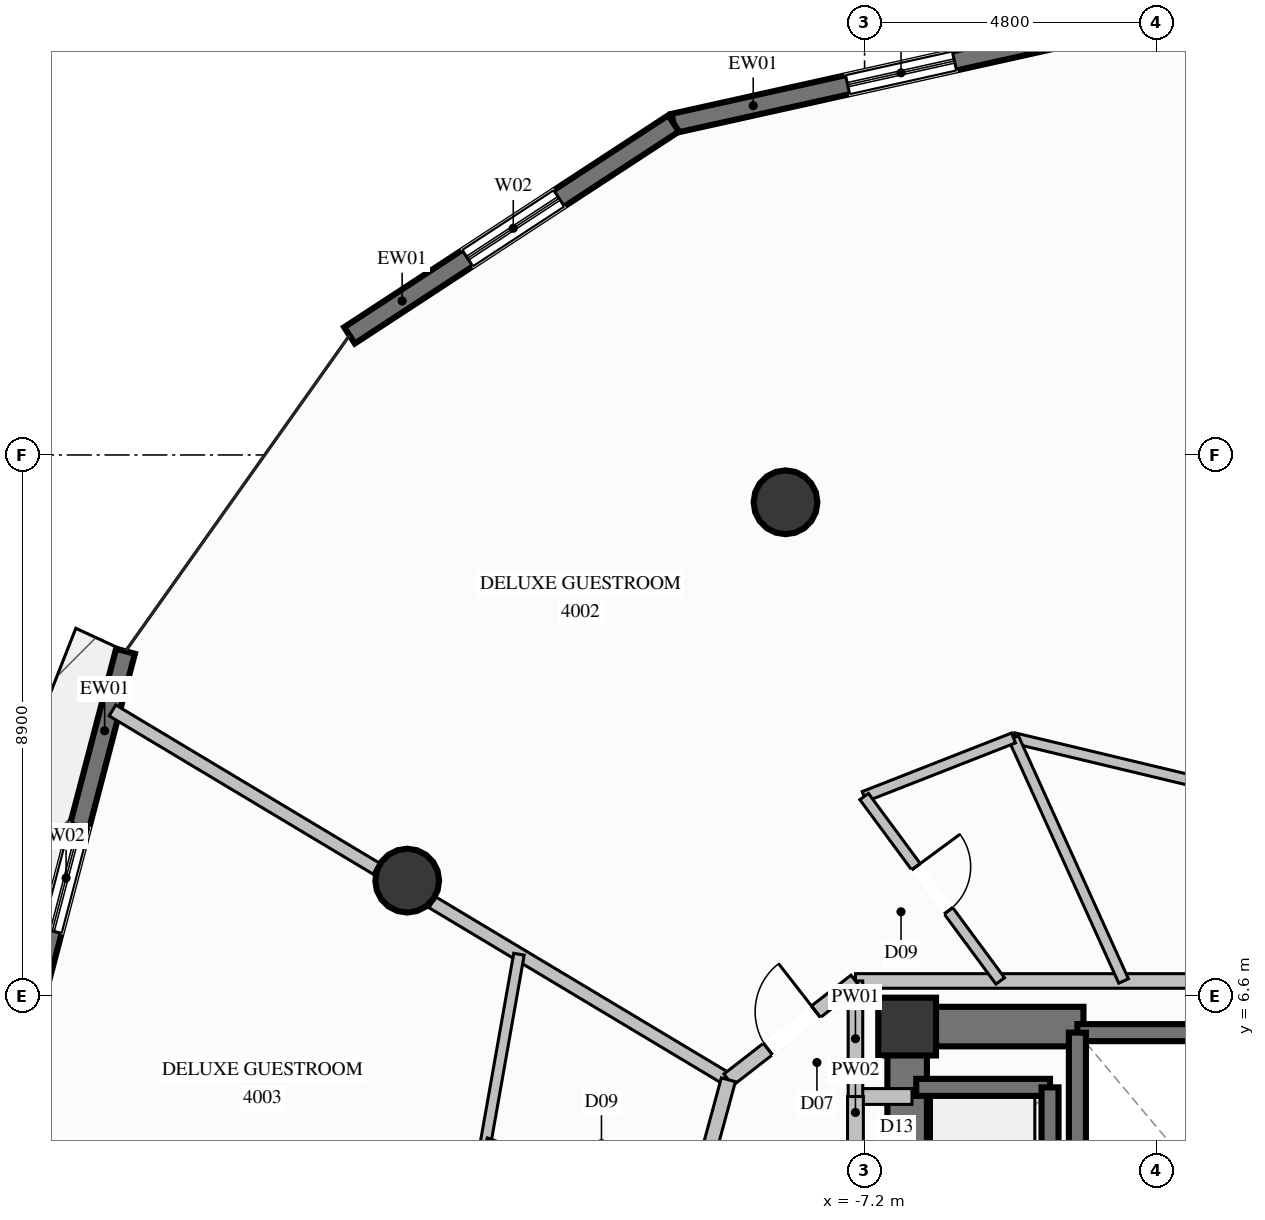
"""IFC4 building model, lengths in metres.
Left out: names, types, materials, properties, quantities, classifications, styles, units other than length and angle.
Written with IfcOpenShell. Run it as: python <this file> out.ifc"""

import sys

from ifc_helpers import new_model, si_unit, direction, frame, frame_2d, origin, origin_2d, place, context, subcontext, project, spatial, rectangle, circle, extrude, element, fill, save


model = new_model("IFC4")
c1 = context("Model", 3, precision=1e-05, world=origin(), true_north=direction((0.0, 1.0)))
c2 = subcontext(c1, "Body", "Model", "MODEL_VIEW")
j1 = project(units=[si_unit("LENGTHUNIT", "METRE"), si_unit("PLANEANGLEUNIT", "RADIAN")], contexts=[c1])
p1 = place(None, origin())
s1 = spatial("IfcSite", under=j1, at=p1, CompositionType="ELEMENT")
p2 = place(p1, origin())
s2 = spatial("IfcBuilding", under=s1, at=p2, CompositionType="ELEMENT")
p3 = place(p2, frame((0.0, 0.0, 149.4)))
s3 = spatial("IfcBuildingStorey", under=s2, at=p3, CompositionType="ELEMENT", Elevation=149.4)
p4 = place(p3, frame((-6.5, 6.1, 0.0), z_axis=(0.0, 0.0, 1.0), x_axis=(1.0, 0.0, 0.0)))
e1 = element("IfcColumn", 1, at=p4, inside=s3, PredefinedType="COLUMN", context=c2, shape_type="SweptSolid", body=[
    extrude(rectangle(XDim=0.95, YDim=0.95, at=origin_2d()), origin(), (0.0, 0.0, 1.0), 3.6),
])
p5 = place(p3, frame((-6.175, 6.1, 0.0), z_axis=(0.0, 0.0, 1.0), x_axis=(1.0, 0.0, 0.0)))
e2 = element("IfcWall", 2, at=p5, inside=s3, PredefinedType="SHEAR", context=c2, shape_type="SweptSolid", body=[
    extrude(rectangle(XDim=2.575, YDim=0.65, at=frame_2d((1.288, 0.0))), origin(), (0.0, 0.0, 1.0), 3.6),
])
p6 = place(p3, frame((-6.5, 2.35, 0.0), z_axis=(0.0, 0.0, 1.0), x_axis=(0.0, 1.0, 0.0)))
e3 = element("IfcWall", 3, at=p6, inside=s3, PredefinedType="SHEAR", context=c2, shape_type="SweptSolid", body=[
    extrude(rectangle(XDim=4.075, YDim=0.65, at=frame_2d((2.038, 0.0))), origin(), (0.0, 0.0, 1.0), 3.6),
])
for number, where, z_axis, x_axis in (
    (4, (-8.5, 14.722, 0.0), (0.0, 0.0, 1.0), (1.0, 0.0, 0.0)),
    (5, (-14.722, 8.5, 0.0), (0.0, 0.0, 1.0), (1.0, 0.0, 0.0)),
):
    element("IfcColumn", number, at=place(p3, frame(where, z_axis=z_axis, x_axis=x_axis)), inside=s3, PredefinedType="COLUMN", context=c2, shape_type="SweptSolid", body=[
        extrude(circle(Radius=0.525, at=origin_2d()), origin(), (0.0, 0.0, 1.0), 3.6),
    ])
p7 = place(p3, frame((-10.34, 20.953, 0.0), z_axis=(0.0, 0.0, 1.0), x_axis=(0.976167944805, 0.217016459136, 0.0)))
e6 = element("IfcWall", 6, at=p7, inside=s3, PredefinedType="SOLIDWALL", context=c2, shape_type="SweptSolid", body=[
    extrude(rectangle(XDim=6.613, YDim=0.32, at=frame_2d((3.306, 0.0))), origin(), (0.0, 0.0, 1.0), 3.35),
])
p8 = place(p7, frame((2.931, 0.0, 0.35)))
e7 = element("IfcOpeningElement", 7, at=p8, cuts=e6, PredefinedType="OPENING", context=c2, shape_type="SweptSolid", body=[
    extrude(rectangle(XDim=1.8, YDim=2.6, at=frame_2d((0.9, 1.3))), frame((0.0, 0.17, 0.0), z_axis=(0.0, -1.0, 0.0), x_axis=(1.0, 0.0, 0.0)), (0.0, 0.0, 1.0), 0.34),
])
p9 = place(p3, frame((-15.671, 17.467, 0.0), z_axis=(0.0, 0.0, 1.0), x_axis=(0.83694732993, 0.547283442947, 0.0)))
e8 = element("IfcWall", 8, at=p9, inside=s3, PredefinedType="SOLIDWALL", context=c2, shape_type="SweptSolid", body=[
    extrude(rectangle(XDim=6.369, YDim=0.32, at=frame_2d((3.185, 0.0))), origin(), (0.0, 0.0, 1.0), 3.35),
])
p10 = place(p9, frame((2.318, 0.0, 0.35)))
e9 = element("IfcOpeningElement", 9, at=p10, cuts=e8, PredefinedType="OPENING", context=c2, shape_type="SweptSolid", body=[
    extrude(rectangle(XDim=1.8, YDim=2.6, at=frame_2d((0.9, 1.3))), frame((0.0, 0.17, 0.0), z_axis=(0.0, -1.0, 0.0), x_axis=(1.0, 0.0, 0.0)), (0.0, 0.0, 1.0), 0.34),
])
p11 = place(p3, frame((-21.032, 5.875, 0.0), z_axis=(0.0, 0.0, 1.0), x_axis=(0.253586412891, 0.967312737018, 0.0)))
e10 = element("IfcWall", 10, at=p11, inside=s3, PredefinedType="SOLIDWALL", context=c2, shape_type="SweptSolid", body=[
    extrude(rectangle(XDim=6.613, YDim=0.32, at=frame_2d((3.307, 0.0))), origin(), (0.0, 0.0, 1.0), 3.35),
])
p12 = place(p11, frame((1.859, 0.0, 0.35)))
e11 = element("IfcOpeningElement", 11, at=p12, cuts=e10, PredefinedType="OPENING", context=c2, shape_type="SweptSolid", body=[
    extrude(rectangle(XDim=1.8, YDim=2.6, at=frame_2d((0.9, 1.3))), frame((0.0, 0.17, 0.0), z_axis=(0.0, -1.0, 0.0), x_axis=(1.0, 0.0, 0.0)), (0.0, 0.0, 1.0), 0.34),
])
p13 = place(p3, frame((-1.6, 6.0, 0.0), z_axis=(0.0, 0.0, 1.0), x_axis=(-1.0, 0.0, 0.0)))
e12 = element("IfcWall", 12, at=p13, inside=s3, PredefinedType="SOLIDWALL", context=c2, shape_type="SweptSolid", body=[
    extrude(rectangle(XDim=2.1, YDim=0.28, at=frame_2d((1.05, 0.0))), origin(), (0.0, 0.0, 1.0), 3.35),
])
p14 = place(p3, frame((-3.7, 6.0, 0.0), z_axis=(0.0, 0.0, 1.0), x_axis=(0.0, -1.0, 0.0)))
e13 = element("IfcWall", 13, at=p14, inside=s3, PredefinedType="SOLIDWALL", context=c2, shape_type="SweptSolid", body=[
    extrude(rectangle(XDim=2.5, YDim=0.28, at=frame_2d((1.25, 0.0))), origin(), (0.0, 0.0, 1.0), 3.35),
])
p15 = place(p3, frame((-4.15, 5.1, 0.0), z_axis=(0.0, 0.0, 1.0), x_axis=(-1.0, 0.0, 0.0)))
e14 = element("IfcWall", 14, at=p15, inside=s3, PredefinedType="SOLIDWALL", context=c2, shape_type="SweptSolid", body=[
    extrude(rectangle(XDim=2.2, YDim=0.28, at=frame_2d((1.1, 0.0))), origin(), (0.0, 0.0, 1.0), 3.35),
])
p16 = place(p3, frame((-4.15, 2.4, 0.0), z_axis=(0.0, 0.0, 1.0), x_axis=(0.0, 1.0, 0.0)))
e15 = element("IfcWall", 15, at=p16, inside=s3, PredefinedType="SOLIDWALL", context=c2, shape_type="SweptSolid", body=[
    extrude(rectangle(XDim=2.7, YDim=0.28, at=frame_2d((1.35, 0.0))), origin(), (0.0, 0.0, 1.0), 3.35),
])
p17 = place(p3, frame((-7.35, 4.95, 0.0), z_axis=(0.0, 0.0, 1.0), x_axis=(1.0, 0.0, 0.0)))
e16 = element("IfcWall", 16, at=p17, inside=s3, PredefinedType="PARTITIONING", context=c2, shape_type="SweptSolid", body=[
    extrude(rectangle(XDim=0.93, YDim=0.26, at=frame_2d((0.465, 0.0))), origin(), (0.0, 0.0, 1.0), 3.35),
])
p18 = place(p3, frame((-7.35, 2.55, 0.0), z_axis=(0.0, 0.0, 1.0), x_axis=(0.0, 1.0, 0.0)))
e17 = element("IfcWall", 17, at=p18, inside=s3, PredefinedType="PARTITIONING", context=c2, shape_type="SweptSolid", body=[
    extrude(rectangle(XDim=2.4, YDim=0.26, at=frame_2d((1.2, 0.0))), origin(), (0.0, 0.0, 1.0), 2.435),
])
p19 = place(p18, frame((0.775, 0.0, 0.0)))
e18 = element("IfcOpeningElement", 18, at=p19, cuts=e17, PredefinedType="OPENING", context=c2, shape_type="SweptSolid", body=[
    extrude(rectangle(XDim=0.85, YDim=2.05, at=frame_2d((0.425, 1.025))), frame((0.0, 0.14, 0.0), z_axis=(0.0, -1.0, 0.0), x_axis=(1.0, 0.0, 0.0)), (0.0, 0.0, 1.0), 0.28),
])
p20 = place(p3, frame((-7.35, 6.85, 0.0), z_axis=(0.0, 0.0, 1.0), x_axis=(1.0, 0.0, 0.0)))
e19 = element("IfcWall", 19, at=p20, inside=s3, PredefinedType="PARTITIONING", context=c2, shape_type="SweptSolid", body=[
    extrude(rectangle(XDim=14.7, YDim=0.24, at=frame_2d((7.35, 0.0))), origin(), (0.0, 0.0, 1.0), 2.435),
])
p21 = place(p3, frame((-7.35, 4.95, 0.0), z_axis=(0.0, 0.0, 1.0), x_axis=(0.0, 1.0, 0.0)))
e20 = element("IfcWall", 20, at=p21, inside=s3, PredefinedType="PARTITIONING", context=c2, shape_type="SweptSolid", body=[
    extrude(rectangle(XDim=1.9, YDim=0.24, at=frame_2d((0.95, 0.0))), origin(), (0.0, 0.0, 1.0), 2.435),
])
p22 = place(p3, frame((-9.44, 5.225, 0.0), z_axis=(0.0, 0.0, 1.0), x_axis=(-0.857690179355, 0.514166856417, 0.0)))
e21 = element("IfcWall", 21, at=p22, inside=s3, PredefinedType="PARTITIONING", context=c2, shape_type="SweptSolid", body=[
    extrude(rectangle(XDim=5.677, YDim=0.21, at=frame_2d((2.838, 0.0))), origin(), (0.0, 0.0, 1.0), 2.717),
])
p23 = place(p3, frame((-15.23, 8.697, 0.0), z_axis=(0.0, 0.0, 1.0), x_axis=(-0.857667413019, 0.514204831409, 0.0)))
e22 = element("IfcWall", 22, at=p23, inside=s3, PredefinedType="PARTITIONING", context=c2, shape_type="SweptSolid", body=[
    extrude(rectangle(XDim=5.06, YDim=0.21, at=frame_2d((2.53, 0.0))), origin(), (0.0, 0.0, 1.0), 3.35),
])
p24 = place(p3, frame((-4.75, 10.846, 0.0), z_axis=(0.0, 0.0, 1.0), x_axis=(0.972580508787, -0.232566450563, 0.0)))
e23 = element("IfcWall", 23, at=p24, inside=s3, PredefinedType="PLUMBINGWALL", context=c2, shape_type="SweptSolid", body=[
    extrude(rectangle(XDim=4.454, YDim=0.175, at=frame_2d((2.227, 0.0))), origin(), (0.0, 0.0, 1.0), 3.35),
])
p25 = place(p3, frame((-4.75, 10.846, 0.0), z_axis=(0.0, 0.0, 1.0), x_axis=(0.412624318024, -0.910901296615, 0.0)))
e24 = element("IfcWall", 24, at=p25, inside=s3, PredefinedType="PLUMBINGWALL", context=c2, shape_type="SweptSolid", body=[
    extrude(rectangle(XDim=4.387, YDim=0.175, at=frame_2d((2.193, 0.0))), origin(), (0.0, 0.0, 1.0), 3.35),
])
p26 = place(p3, frame((-7.207, 9.883, 0.0), z_axis=(0.0, 0.0, 1.0), x_axis=(0.931057024994, 0.364873698984, 0.0)))
e25 = element("IfcWall", 25, at=p26, inside=s3, PredefinedType="PLUMBINGWALL", context=c2, shape_type="SweptSolid", body=[
    extrude(rectangle(XDim=2.639, YDim=0.175, at=frame_2d((1.319, 0.0))), origin(), (0.0, 0.0, 1.0), 3.35),
])
p27 = place(p3, frame((-7.207, 9.883, 0.0), z_axis=(0.0, 0.0, 1.0), x_axis=(0.593753460512, -0.804647020829, 0.0)))
e26 = element("IfcWall", 26, at=p27, inside=s3, PredefinedType="PLUMBINGWALL", context=c2, shape_type="SweptSolid", body=[
    extrude(rectangle(XDim=3.769, YDim=0.175, at=frame_2d((1.885, 0.0))), origin(), (0.0, 0.0, 1.0), 2.717),
])
p28 = place(p27, frame((1.435, 0.0, 0.0)))
e27 = element("IfcOpeningElement", 27, at=p28, cuts=e26, PredefinedType="OPENING", context=c2, shape_type="SweptSolid", body=[
    extrude(rectangle(XDim=0.9, YDim=2.1, at=frame_2d((0.45, 1.05))), frame((0.0, 0.098, 0.0), z_axis=(0.0, -1.0, 0.0), x_axis=(1.0, 0.0, 0.0)), (0.0, 0.0, 1.0), 0.195),
])
p29 = place(p3, frame((-9.44, 5.225, 0.0), z_axis=(0.0, 0.0, 1.0), x_axis=(0.789431664708, 0.613838453306, 0.0)))
e28 = element("IfcWall", 28, at=p29, inside=s3, PredefinedType="PARTITIONING", context=c2, shape_type="SweptSolid", body=[
    extrude(rectangle(XDim=2.647, YDim=0.24, at=frame_2d((1.324, 0.0))), origin(), (0.0, 0.0, 1.0), 3.35),
])
p30 = place(p29, frame((0.824, 0.0, 0.0)))
e29 = element("IfcOpeningElement", 29, at=p30, cuts=e28, PredefinedType="OPENING", context=c2, shape_type="SweptSolid", body=[
    extrude(rectangle(XDim=1.0, YDim=2.2, at=frame_2d((0.5, 1.1))), frame((0.0, 0.13, 0.0), z_axis=(0.0, -1.0, 0.0), x_axis=(1.0, 0.0, 0.0)), (0.0, 0.0, 1.0), 0.26),
])
p31 = place(p3, frame((-9.44, 5.225, 0.0), z_axis=(0.0, 0.0, 1.0), x_axis=(-0.262004776073, -0.965066576623, 0.0)))
e30 = element("IfcWall", 30, at=p31, inside=s3, PredefinedType="PARTITIONING", context=c2, shape_type="SweptSolid", body=[
    extrude(rectangle(XDim=2.34, YDim=0.24, at=frame_2d((1.17, 0.0))), origin(), (0.0, 0.0, 1.0), 3.35),
])
p32 = place(p3, frame((-12.884, 7.29, 0.0), z_axis=(0.0, 0.0, 1.0), x_axis=(-0.174187389085, -0.984712523269, 0.0)))
e31 = element("IfcWall", 31, at=p32, inside=s3, PredefinedType="PLUMBINGWALL", context=c2, shape_type="SweptSolid", body=[
    extrude(rectangle(XDim=3.152, YDim=0.175, at=frame_2d((1.576, 0.0))), origin(), (0.0, 0.0, 1.0), 3.35),
])
p33 = place(p3, frame((-10.053, 2.967, 0.0), z_axis=(0.0, 0.0, 1.0), x_axis=(-0.940696709382, 0.339248730223, 0.0)))
e32 = element("IfcWall", 32, at=p33, inside=s3, PredefinedType="PLUMBINGWALL", context=c2, shape_type="SweptSolid", body=[
    extrude(rectangle(XDim=3.593, YDim=0.175, at=frame_2d((1.797, 0.0))), origin(), (0.0, 0.0, 1.0), 3.35),
])
p34 = place(p33, frame((1.347, 0.0, 0.0)))
e33 = element("IfcOpeningElement", 33, at=p34, cuts=e32, PredefinedType="OPENING", context=c2, shape_type="SweptSolid", body=[
    extrude(rectangle(XDim=0.9, YDim=2.1, at=frame_2d((0.45, 1.05))), frame((0.0, 0.098, 0.0), z_axis=(0.0, -1.0, 0.0), x_axis=(1.0, 0.0, 0.0)), (0.0, 0.0, 1.0), 0.195),
])
p35 = place(p8, origin())
e34 = element("IfcWindow", 34, at=p35, inside=s3, PartitioningType="SINGLE_PANEL", PredefinedType="WINDOW", context=c2, shape_type="SweptSolid", body=[
    extrude(rectangle(XDim=1.8, YDim=2.6, at=frame_2d((0.9, 1.3))), frame((0.0, 0.03, 0.0), z_axis=(0.0, -1.0, 0.0), x_axis=(1.0, 0.0, 0.0)), (0.0, 0.0, 1.0), 0.06),
])
fill(e7, e34)
p36 = place(p10, origin())
e35 = element("IfcWindow", 35, at=p36, inside=s3, PartitioningType="SINGLE_PANEL", PredefinedType="WINDOW", context=c2, shape_type="SweptSolid", body=[
    extrude(rectangle(XDim=1.8, YDim=2.6, at=frame_2d((0.9, 1.3))), frame((0.0, 0.03, 0.0), z_axis=(0.0, -1.0, 0.0), x_axis=(1.0, 0.0, 0.0)), (0.0, 0.0, 1.0), 0.06),
])
fill(e9, e35)
p37 = place(p12, origin())
e36 = element("IfcWindow", 36, at=p37, inside=s3, PartitioningType="SINGLE_PANEL", PredefinedType="WINDOW", context=c2, shape_type="SweptSolid", body=[
    extrude(rectangle(XDim=1.8, YDim=2.6, at=frame_2d((0.9, 1.3))), frame((0.0, 0.03, 0.0), z_axis=(0.0, -1.0, 0.0), x_axis=(1.0, 0.0, 0.0)), (0.0, 0.0, 1.0), 0.06),
])
fill(e11, e36)
p38 = place(p28, origin())
e37 = element("IfcDoor", 37, at=p38, inside=s3, OperationType="SINGLE_SWING_LEFT", PredefinedType="DOOR", context=c2, shape_type="SweptSolid", body=[
    extrude(rectangle(XDim=0.9, YDim=2.1, at=frame_2d((0.45, 1.05))), frame((0.0, 0.025, 0.0), z_axis=(0.0, -1.0, 0.0), x_axis=(1.0, 0.0, 0.0)), (0.0, 0.0, 1.0), 0.05),
])
fill(e27, e37)
p39 = place(p30, origin())
e38 = element("IfcDoor", 38, at=p39, inside=s3, OperationType="SINGLE_SWING_RIGHT", PredefinedType="DOOR", context=c2, shape_type="SweptSolid", body=[
    extrude(rectangle(XDim=1.0, YDim=2.2, at=frame_2d((0.5, 1.1))), frame((0.0, 0.025, 0.0), z_axis=(0.0, -1.0, 0.0), x_axis=(1.0, 0.0, 0.0)), (0.0, 0.0, 1.0), 0.05),
])
fill(e29, e38)
save(model, sys.argv[1])
